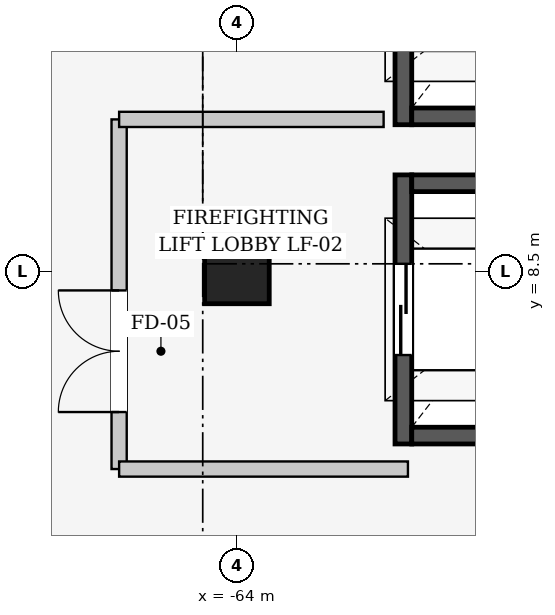
"""IFC4 building model, lengths in metres.
Left out: names, types, materials, properties, quantities, classifications, styles, units other than length and angle.
Written with IfcOpenShell. Run it as: python <this file> out.ifc"""

import sys

from ifc_helpers import new_model, si_unit, direction, frame, frame_2d, origin, origin_2d, place, context, subcontext, project, spatial, rectangle, extrude, element, fill, save


model = new_model("IFC4")
c1 = context("Model", 3, precision=1e-05, world=origin(), true_north=direction((0.0, 1.0)))
c2 = subcontext(c1, "Body", "Model", "MODEL_VIEW")
j1 = project(units=[si_unit("LENGTHUNIT", "METRE"), si_unit("PLANEANGLEUNIT", "RADIAN")], contexts=[c1])
p1 = place(None, origin())
s1 = spatial("IfcSite", under=j1, at=p1, CompositionType="ELEMENT")
p2 = place(p1, origin())
s2 = spatial("IfcBuilding", under=s1, at=p2, CompositionType="ELEMENT")
p3 = place(p2, frame((0.0, 0.0, 16.2)))
s3 = spatial("IfcBuildingStorey", under=s2, at=p3, CompositionType="ELEMENT", Elevation=16.2)
p4 = place(p3, frame((-64.0, 8.5, 0.0), z_axis=(0.0, 0.0, 1.0), x_axis=(1.0, 0.0, 0.0)))
e1 = element("IfcColumn", 1, at=p4, inside=s3, PredefinedType="COLUMN", context=c2, shape_type="SweptSolid", body=[
    extrude(rectangle(XDim=0.85, YDim=0.85, at=origin_2d()), origin(), (0.0, 0.0, 1.0), 4.8),
])
p5 = place(p3, frame((-61.81, 6.23, 0.0), z_axis=(0.0, 0.0, 1.0), x_axis=(0.0, 1.0, 0.0)))
e2 = element("IfcWall", 2, at=p5, inside=s3, PredefinedType="SHEAR", context=c2, shape_type="SweptSolid", body=[
    extrude(rectangle(XDim=3.54, YDim=0.22, at=frame_2d((1.77, 0.0))), origin(), (0.0, 0.0, 1.0), 4.8),
])
p6 = place(p5, frame((1.17, 0.0, 0.0)))
e3 = element("IfcOpeningElement", 3, at=p6, cuts=e2, PredefinedType="OPENING", context=c2, shape_type="SweptSolid", body=[
    extrude(rectangle(XDim=1.2, YDim=2.2, at=frame_2d((0.6, 1.1))), frame((0.0, 0.12, 0.0), z_axis=(0.0, -1.0, 0.0), x_axis=(1.0, 0.0, 0.0)), (0.0, 0.0, 1.0), 0.24),
])
for number, where, z_axis, x_axis in (
    (4, (-61.7, 9.66, 0.0), (0.0, 0.0, 1.0), (1.0, 0.0, 0.0)),
    (5, (-59.3, 6.34, 0.0), (0.0, 0.0, 1.0), (-1.0, 0.0, 0.0)),
):
    element("IfcWall", number, at=place(p3, frame(where, z_axis=z_axis, x_axis=x_axis)), inside=s3, PredefinedType="SHEAR", context=c2, shape_type="SweptSolid", body=[
        extrude(rectangle(XDim=2.4, YDim=0.22, at=frame_2d((1.2, 0.0))), origin(), (0.0, 0.0, 1.0), 4.8),
    ])
p7 = place(p3, frame((-61.81, 10.43, 0.0), z_axis=(0.0, 0.0, 1.0), x_axis=(0.0, 1.0, 0.0)))
e6 = element("IfcWall", 6, at=p7, inside=s3, PredefinedType="SHEAR", context=c2, shape_type="SweptSolid", body=[
    extrude(rectangle(XDim=3.54, YDim=0.22, at=frame_2d((1.77, 0.0))), origin(), (0.0, 0.0, 1.0), 4.8),
])
p8 = place(p7, frame((1.22, 0.0, 0.0)))
e7 = element("IfcOpeningElement", 7, at=p8, cuts=e6, PredefinedType="OPENING", context=c2, shape_type="SweptSolid", body=[
    extrude(rectangle(XDim=1.1, YDim=2.2, at=frame_2d((0.55, 1.1))), frame((0.0, 0.12, 0.0), z_axis=(0.0, -1.0, 0.0), x_axis=(1.0, 0.0, 0.0)), (0.0, 0.0, 1.0), 0.24),
])
p9 = place(p3, frame((-59.3, 10.54, 0.0), z_axis=(0.0, 0.0, 1.0), x_axis=(-1.0, 0.0, 0.0)))
e8 = element("IfcWall", 8, at=p9, inside=s3, PredefinedType="SHEAR", context=c2, shape_type="SweptSolid", body=[
    extrude(rectangle(XDim=2.4, YDim=0.22, at=frame_2d((1.2, 0.0))), origin(), (0.0, 0.0, 1.0), 4.8),
])
p10 = place(p3, frame((-65.55, 5.9, 0.0), z_axis=(0.0, 0.0, 1.0), x_axis=(0.0, 1.0, 0.0)))
e9 = element("IfcWall", 9, at=p10, inside=s3, PredefinedType="PARTITIONING", context=c2, shape_type="SweptSolid", body=[
    extrude(rectangle(XDim=4.6, YDim=0.2, at=frame_2d((2.3, 0.0))), origin(), (0.0, 0.0, 1.0), 3.545),
])
p11 = place(p10, frame((0.75, 0.0, 0.0)))
e10 = element("IfcOpeningElement", 10, at=p11, cuts=e9, PredefinedType="OPENING", context=c2, shape_type="SweptSolid", body=[
    extrude(rectangle(XDim=1.6, YDim=2.2, at=frame_2d((0.8, 1.1))), frame((0.0, 0.11, 0.0), z_axis=(0.0, -1.0, 0.0), x_axis=(1.0, 0.0, 0.0)), (0.0, 0.0, 1.0), 0.22),
])
p12 = place(p3, frame((-65.55, 10.5, 0.0), z_axis=(0.0, 0.0, 1.0), x_axis=(1.0, 0.0, 0.0)))
e11 = element("IfcWall", 11, at=p12, inside=s3, PredefinedType="PARTITIONING", context=c2, shape_type="SweptSolid", body=[
    extrude(rectangle(XDim=3.48, YDim=0.2, at=frame_2d((1.74, 0.0))), origin(), (0.0, 0.0, 1.0), 3.845),
])
p13 = place(p3, frame((-61.75, 5.9, 0.0), z_axis=(0.0, 0.0, 1.0), x_axis=(-1.0, 0.0, 0.0)))
e12 = element("IfcWall", 12, at=p13, inside=s3, PredefinedType="PARTITIONING", context=c2, shape_type="SweptSolid", body=[
    extrude(rectangle(XDim=3.8, YDim=0.2, at=frame_2d((1.9, 0.0))), origin(), (0.0, 0.0, 1.0), 3.845),
])
p14 = place(p6, origin())
e13 = element("IfcDoor", 13, at=p14, inside=s3, OperationType="SLIDING_TO_LEFT", PredefinedType="DOOR", context=c2, shape_type="SweptSolid", body=[
    extrude(rectangle(XDim=1.2, YDim=2.2, at=frame_2d((0.6, 1.1))), frame((0.0, 0.025, 0.0), z_axis=(0.0, -1.0, 0.0), x_axis=(1.0, 0.0, 0.0)), (0.0, 0.0, 1.0), 0.05),
])
fill(e3, e13)
p15 = place(p11, origin())
e14 = element("IfcDoor", 14, at=p15, inside=s3, OperationType="DOUBLE_DOOR_SINGLE_SWING", PredefinedType="DOOR", context=c2, shape_type="SweptSolid", body=[
    extrude(rectangle(XDim=1.6, YDim=2.2, at=frame_2d((0.8, 1.1))), frame((0.0, 0.025, 0.0), z_axis=(0.0, -1.0, 0.0), x_axis=(1.0, 0.0, 0.0)), (0.0, 0.0, 1.0), 0.05),
])
fill(e10, e14)
save(model, sys.argv[1])
